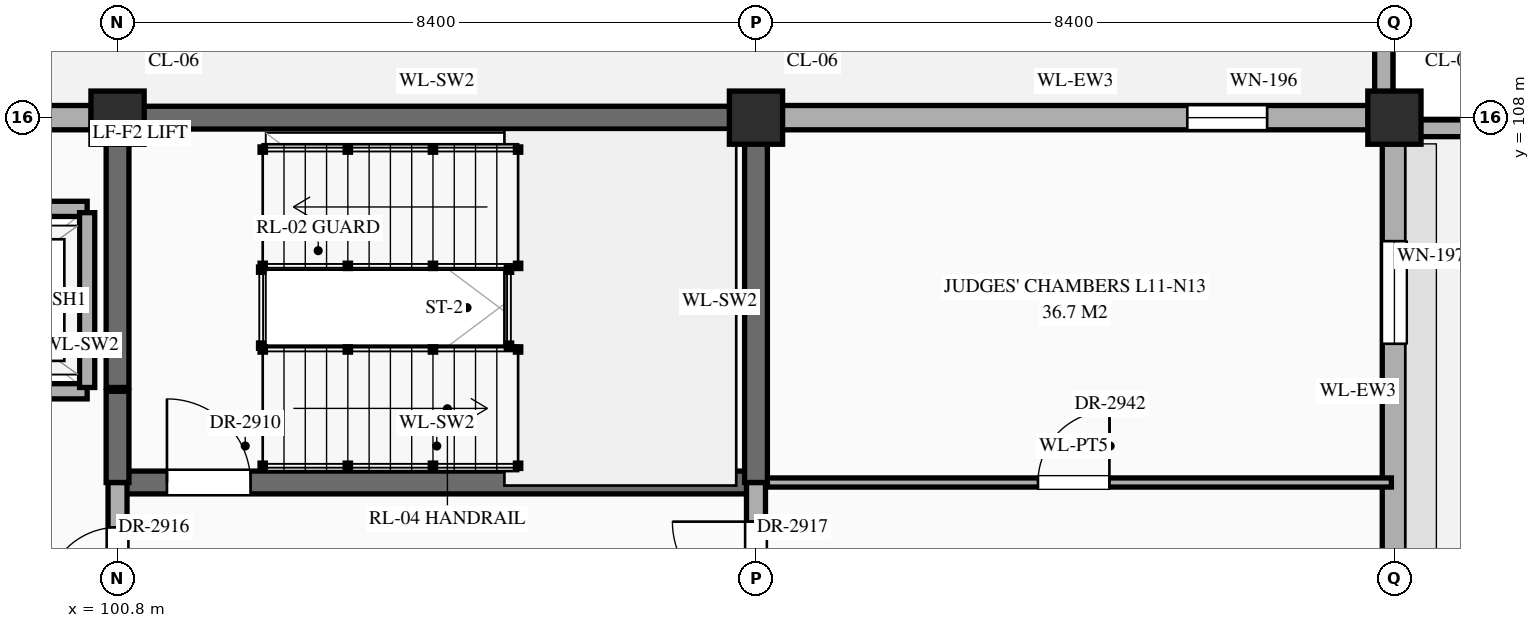
"""IFC4 building model, lengths in metres.
Left out: names, types, materials, properties, quantities, classifications, styles, units other than length and angle.
Written with IfcOpenShell. Run it as: python <this file> out.ifc"""

import sys

from ifc_helpers import new_model, si_unit, direction, frame, frame_2d, origin, origin_2d, place, context, subcontext, project, spatial, rectangle, extrude, element, fill, save


model = new_model("IFC4")
c1 = context("Model", 3, precision=1e-05, world=origin(), true_north=direction((0.0, 1.0)))
c2 = subcontext(c1, "Body", "Model", "MODEL_VIEW")
j1 = project(units=[si_unit("LENGTHUNIT", "METRE"), si_unit("PLANEANGLEUNIT", "RADIAN")], contexts=[c1])
p1 = place(None, origin())
s1 = spatial("IfcSite", under=j1, at=p1, CompositionType="ELEMENT")
p2 = place(p1, origin())
s2 = spatial("IfcBuilding", under=s1, at=p2, CompositionType="ELEMENT")
p3 = place(p2, frame((0.0, 0.0, 47.7)))
s3 = spatial("IfcBuildingStorey", under=s2, at=p3, CompositionType="ELEMENT", Elevation=47.7)
for number, where, z_axis, x_axis in (
    (1, (100.8, 108.0, 0.0), (0.0, 0.0, 1.0), (1.0, 0.0, 0.0)),
    (2, (109.2, 108.0, 0.0), (0.0, 0.0, 1.0), (1.0, 0.0, 0.0)),
    (3, (117.6, 108.0, 0.0), (0.0, 0.0, 1.0), (1.0, 0.0, 0.0)),
):
    element("IfcColumn", number, at=place(p3, frame(where, z_axis=z_axis, x_axis=x_axis)), inside=s3, PredefinedType="COLUMN", context=c2, shape_type="SweptSolid", body=[
        extrude(rectangle(XDim=0.7, YDim=0.7, at=origin_2d()), origin(), (0.0, 0.0, 1.0), 4.2),
    ])
p4 = place(p3, frame((92.745, 108.0, 0.0), z_axis=(0.0, 0.0, 1.0), x_axis=(1.0, 0.0, 0.0)))
e4 = element("IfcWall", 4, at=p4, inside=s3, PredefinedType="STANDARD", context=c2, shape_type="SweptSolid", body=[
    extrude(rectangle(XDim=7.71, YDim=0.32, at=frame_2d((3.855, 0.0))), origin(), (0.0, 0.0, 1.0), 3.31),
])
p5 = place(p3, frame((101.145, 108.0, 0.0), z_axis=(0.0, 0.0, 1.0), x_axis=(1.0, 0.0, 0.0)))
e5 = element("IfcWall", 5, at=p5, inside=s3, PredefinedType="SHEAR", context=c2, shape_type="SweptSolid", body=[
    extrude(rectangle(XDim=7.71, YDim=0.3, at=frame_2d((3.855, 0.0))), origin(), (0.0, 0.0, 1.0), 3.96),
])
p6 = place(p3, frame((109.545, 108.0, 0.0), z_axis=(0.0, 0.0, 1.0), x_axis=(1.0, 0.0, 0.0)))
e6 = element("IfcWall", 6, at=p6, inside=s3, PredefinedType="STANDARD", context=c2, shape_type="SweptSolid", body=[
    extrude(rectangle(XDim=7.71, YDim=0.32, at=frame_2d((3.855, 0.0))), origin(), (0.0, 0.0, 1.0), 3.31),
])
p7 = place(p6, frame((5.33, 0.0, 0.55)))
e7 = element("IfcOpeningElement", 7, at=p7, cuts=e6, PredefinedType="OPENING", context=c2, shape_type="SweptSolid", body=[
    extrude(rectangle(XDim=1.05, YDim=1.56, at=frame_2d((0.525, 0.78))), frame((0.0, 0.172, 0.0), z_axis=(0.0, -1.0, 0.0), x_axis=(1.0, 0.0, 0.0)), (0.0, 0.0, 1.0), 0.344),
])
p8 = place(p3, frame((117.6, 101.145, 0.0), z_axis=(0.0, 0.0, 1.0), x_axis=(0.0, 1.0, 0.0)))
e8 = element("IfcWall", 8, at=p8, inside=s3, PredefinedType="STANDARD", context=c2, shape_type="SweptSolid", body=[
    extrude(rectangle(XDim=6.51, YDim=0.32, at=frame_2d((3.255, 0.0))), origin(), (0.0, 0.0, 1.0), 3.31),
])
p9 = place(p8, frame((3.88, 0.0, 0.55)))
e9 = element("IfcOpeningElement", 9, at=p9, cuts=e8, PredefinedType="OPENING", context=c2, shape_type="SweptSolid", body=[
    extrude(rectangle(XDim=1.35, YDim=2.12, at=frame_2d((0.675, 1.06))), frame((0.0, 0.172, 0.0), z_axis=(0.0, -1.0, 0.0), x_axis=(1.0, 0.0, 0.0)), (0.0, 0.0, 1.0), 0.344),
])
p10 = place(p3, frame((117.46, 108.3, 0.0), z_axis=(0.0, 0.0, 1.0), x_axis=(0.0, 1.0, 0.0)))
e10 = element("IfcWall", 10, at=p10, inside=s3, PredefinedType="PARAPET", context=c2, shape_type="SweptSolid", body=[
    extrude(rectangle(XDim=6.76, YDim=0.24, at=frame_2d((3.38, 0.0))), origin(), (0.0, 0.0, 1.0), 1.2),
])
p11 = place(p3, frame((125.86, 107.86, 0.0), z_axis=(0.0, 0.0, 1.0), x_axis=(-1.0, 0.0, 0.0)))
e11 = element("IfcWall", 11, at=p11, inside=s3, PredefinedType="PARAPET", context=c2, shape_type="SweptSolid", body=[
    extrude(rectangle(XDim=7.96, YDim=0.22, at=frame_2d((3.98, 0.0))), origin(), (0.0, 0.0, 1.0), 1.2),
])
p12 = place(p3, frame((100.8, 103.2, 0.0), z_axis=(0.0, 0.0, 1.0), x_axis=(1.0, 0.0, 0.0)))
e12 = element("IfcWall", 12, at=p12, inside=s3, PredefinedType="SHEAR", context=c2, shape_type="SweptSolid", body=[
    extrude(rectangle(XDim=8.4, YDim=0.3, at=frame_2d((4.2, 0.0))), origin(), (0.0, 0.0, 1.0), 3.96),
])
p13 = place(p12, frame((0.65, 0.0, 0.0)))
e13 = element("IfcOpeningElement", 13, at=p13, cuts=e12, PredefinedType="OPENING", context=c2, shape_type="SweptSolid", body=[
    extrude(rectangle(XDim=1.1, YDim=2.2, at=frame_2d((0.55, 1.1))), frame((0.0, 0.162, 0.0), z_axis=(0.0, -1.0, 0.0), x_axis=(1.0, 0.0, 0.0)), (0.0, 0.0, 1.0), 0.324),
])
p14 = place(p3, frame((109.2, 103.2, 0.0), z_axis=(0.0, 0.0, 1.0), x_axis=(1.0, 0.0, 0.0)))
e14 = element("IfcWall", 14, at=p14, inside=s3, PredefinedType="STANDARD", context=c2, shape_type="SweptSolid", body=[
    extrude(rectangle(XDim=8.36, YDim=0.12, at=frame_2d((4.18, 0.0))), origin(), (0.0, 0.0, 1.0), 3.96),
])
p15 = place(p14, frame((3.71, 0.0, 0.0)))
e15 = element("IfcOpeningElement", 15, at=p15, cuts=e14, PredefinedType="OPENING", context=c2, shape_type="SweptSolid", body=[
    extrude(rectangle(XDim=0.94, YDim=2.3, at=frame_2d((0.47, 1.15))), frame((0.0, 0.072, 0.0), z_axis=(0.0, -1.0, 0.0), x_axis=(1.0, 0.0, 0.0)), (0.0, 0.0, 1.0), 0.144),
])
p16 = place(p3, frame((97.4, 104.4, 0.0), z_axis=(0.0, 0.0, 1.0), x_axis=(1.0, 0.0, 0.0)))
e16 = element("IfcWall", 16, at=p16, inside=s3, PredefinedType="STANDARD", context=c2, shape_type="SweptSolid", body=[
    extrude(rectangle(XDim=3.0, YDim=0.2, at=frame_2d((1.5, 0.0))), origin(), (0.0, 0.0, 1.0), 3.96),
])
p17 = place(p16, frame((0.9, 0.0, 0.0)))
e17 = element("IfcOpeningElement", 17, at=p17, cuts=e16, PredefinedType="OPENING", context=c2, shape_type="SweptSolid", body=[
    extrude(rectangle(XDim=1.2, YDim=2.15, at=frame_2d((0.6, 1.075))), frame((0.0, 0.112, 0.0), z_axis=(0.0, -1.0, 0.0), x_axis=(1.0, 0.0, 0.0)), (0.0, 0.0, 1.0), 0.224),
])
p18 = place(p3, frame((97.4, 106.8, 0.0), z_axis=(0.0, 0.0, 1.0), x_axis=(1.0, 0.0, 0.0)))
e18 = element("IfcWall", 18, at=p18, inside=s3, PredefinedType="STANDARD", context=c2, shape_type="SweptSolid", body=[
    extrude(rectangle(XDim=3.0, YDim=0.2, at=frame_2d((1.5, 0.0))), origin(), (0.0, 0.0, 1.0), 3.96),
])
p19 = place(p3, frame((100.4, 104.45, 0.0), z_axis=(0.0, 0.0, 1.0), x_axis=(0.0, 1.0, 0.0)))
e19 = element("IfcWall", 19, at=p19, inside=s3, PredefinedType="STANDARD", context=c2, shape_type="SweptSolid", body=[
    extrude(rectangle(XDim=2.3, YDim=0.2, at=frame_2d((1.15, 0.0))), origin(), (0.0, 0.0, 1.0), 3.96),
])
p20 = place(p3, frame((100.8, 100.8, 0.0), z_axis=(0.0, 0.0, 1.0), x_axis=(0.0, 1.0, 0.0)))
e20 = element("IfcWall", 20, at=p20, inside=s3, PredefinedType="STANDARD", context=c2, shape_type="SweptSolid", body=[
    extrude(rectangle(XDim=2.4, YDim=0.25, at=frame_2d((1.2, 0.0))), origin(), (0.0, 0.0, 1.0), 3.21),
])
p21 = place(p20, frame((0.86, 0.0, 0.0)))
e21 = element("IfcOpeningElement", 21, at=p21, cuts=e20, PredefinedType="OPENING", context=c2, shape_type="SweptSolid", body=[
    extrude(rectangle(XDim=0.95, YDim=2.15, at=frame_2d((0.475, 1.075))), frame((0.0, 0.137, 0.0), z_axis=(0.0, -1.0, 0.0), x_axis=(1.0, 0.0, 0.0)), (0.0, 0.0, 1.0), 0.274),
])
p22 = place(p3, frame((100.8, 103.2, 0.0), z_axis=(0.0, 0.0, 1.0), x_axis=(0.0, 1.0, 0.0)))
e22 = element("IfcWall", 22, at=p22, inside=s3, PredefinedType="SHEAR", context=c2, shape_type="SweptSolid", body=[
    extrude(rectangle(XDim=1.2, YDim=0.3, at=frame_2d((0.6, 0.0))), origin(), (0.0, 0.0, 1.0), 3.96),
])
p23 = place(p3, frame((100.8, 104.45, 0.0), z_axis=(0.0, 0.0, 1.0), x_axis=(0.0, 1.0, 0.0)))
e23 = element("IfcWall", 23, at=p23, inside=s3, PredefinedType="SHEAR", context=c2, shape_type="SweptSolid", body=[
    extrude(rectangle(XDim=3.46, YDim=0.3, at=frame_2d((1.73, 0.0))), origin(), (0.0, 0.0, 1.0), 3.96),
])
p24 = place(p3, frame((109.2, 100.8, 0.0), z_axis=(0.0, 0.0, 1.0), x_axis=(0.0, 1.0, 0.0)))
e24 = element("IfcWall", 24, at=p24, inside=s3, PredefinedType="STANDARD", context=c2, shape_type="SweptSolid", body=[
    extrude(rectangle(XDim=2.4, YDim=0.25, at=frame_2d((1.2, 0.0))), origin(), (0.0, 0.0, 1.0), 3.21),
])
p25 = place(p24, frame((0.785, 0.0, 0.0)))
e25 = element("IfcOpeningElement", 25, at=p25, cuts=e24, PredefinedType="OPENING", context=c2, shape_type="SweptSolid", body=[
    extrude(rectangle(XDim=1.1, YDim=2.2, at=frame_2d((0.55, 1.1))), frame((0.0, 0.137, 0.0), z_axis=(0.0, -1.0, 0.0), x_axis=(1.0, 0.0, 0.0)), (0.0, 0.0, 1.0), 0.274),
])
p26 = place(p3, frame((109.2, 103.2, 0.0), z_axis=(0.0, 0.0, 1.0), x_axis=(0.0, 1.0, 0.0)))
e26 = element("IfcWall", 26, at=p26, inside=s3, PredefinedType="SHEAR", context=c2, shape_type="SweptSolid", body=[
    extrude(rectangle(XDim=4.76, YDim=0.3, at=frame_2d((2.38, 0.0))), origin(), (0.0, 0.0, 1.0), 3.96),
])
p27 = place(p7, origin())
e27 = element("IfcWindow", 27, at=p27, inside=s3, PartitioningType="SINGLE_PANEL", PredefinedType="WINDOW", context=c2, shape_type="SweptSolid", body=[
    extrude(rectangle(XDim=1.05, YDim=1.56, at=frame_2d((0.525, 0.78))), frame((0.0, 0.03, 0.0), z_axis=(0.0, -1.0, 0.0), x_axis=(1.0, 0.0, 0.0)), (0.0, 0.0, 1.0), 0.06),
])
fill(e7, e27)
p28 = place(p9, origin())
e28 = element("IfcWindow", 28, at=p28, inside=s3, PartitioningType="SINGLE_PANEL", PredefinedType="WINDOW", context=c2, shape_type="SweptSolid", body=[
    extrude(rectangle(XDim=1.35, YDim=2.12, at=frame_2d((0.675, 1.06))), frame((0.0, 0.03, 0.0), z_axis=(0.0, -1.0, 0.0), x_axis=(1.0, 0.0, 0.0)), (0.0, 0.0, 1.0), 0.06),
])
fill(e9, e28)
p29 = place(p13, origin())
e29 = element("IfcDoor", 29, at=p29, inside=s3, OperationType="SINGLE_SWING_LEFT", PredefinedType="DOOR", context=c2, shape_type="SweptSolid", body=[
    extrude(rectangle(XDim=1.1, YDim=2.2, at=frame_2d((0.55, 1.1))), frame((0.0, 0.025, 0.0), z_axis=(0.0, -1.0, 0.0), x_axis=(1.0, 0.0, 0.0)), (0.0, 0.0, 1.0), 0.05),
])
fill(e13, e29)
p30 = place(p21, origin())
e30 = element("IfcDoor", 30, at=p30, inside=s3, OperationType="SINGLE_SWING_LEFT", PredefinedType="DOOR", context=c2, shape_type="SweptSolid", body=[
    extrude(rectangle(XDim=0.95, YDim=2.15, at=frame_2d((0.475, 1.075))), frame((0.0, 0.025, 0.0), z_axis=(0.0, -1.0, 0.0), x_axis=(1.0, 0.0, 0.0)), (0.0, 0.0, 1.0), 0.05),
])
fill(e21, e30)
p31 = place(p25, origin())
e31 = element("IfcDoor", 31, at=p31, inside=s3, OperationType="SINGLE_SWING_RIGHT", PredefinedType="DOOR", context=c2, shape_type="SweptSolid", body=[
    extrude(rectangle(XDim=1.1, YDim=2.2, at=frame_2d((0.55, 1.1))), frame((0.0, 0.025, 0.0), z_axis=(0.0, -1.0, 0.0), x_axis=(1.0, 0.0, 0.0)), (0.0, 0.0, 1.0), 0.05),
])
fill(e25, e31)
p32 = place(p15, origin())
e32 = element("IfcDoor", 32, at=p32, inside=s3, OperationType="SINGLE_SWING_RIGHT", PredefinedType="DOOR", context=c2, shape_type="SweptSolid", body=[
    extrude(rectangle(XDim=0.94, YDim=2.3, at=frame_2d((0.47, 1.15))), frame((0.0, 0.025, 0.0), z_axis=(0.0, -1.0, 0.0), x_axis=(1.0, 0.0, 0.0)), (0.0, 0.0, 1.0), 0.05),
])
fill(e15, e32)
save(model, sys.argv[1])
